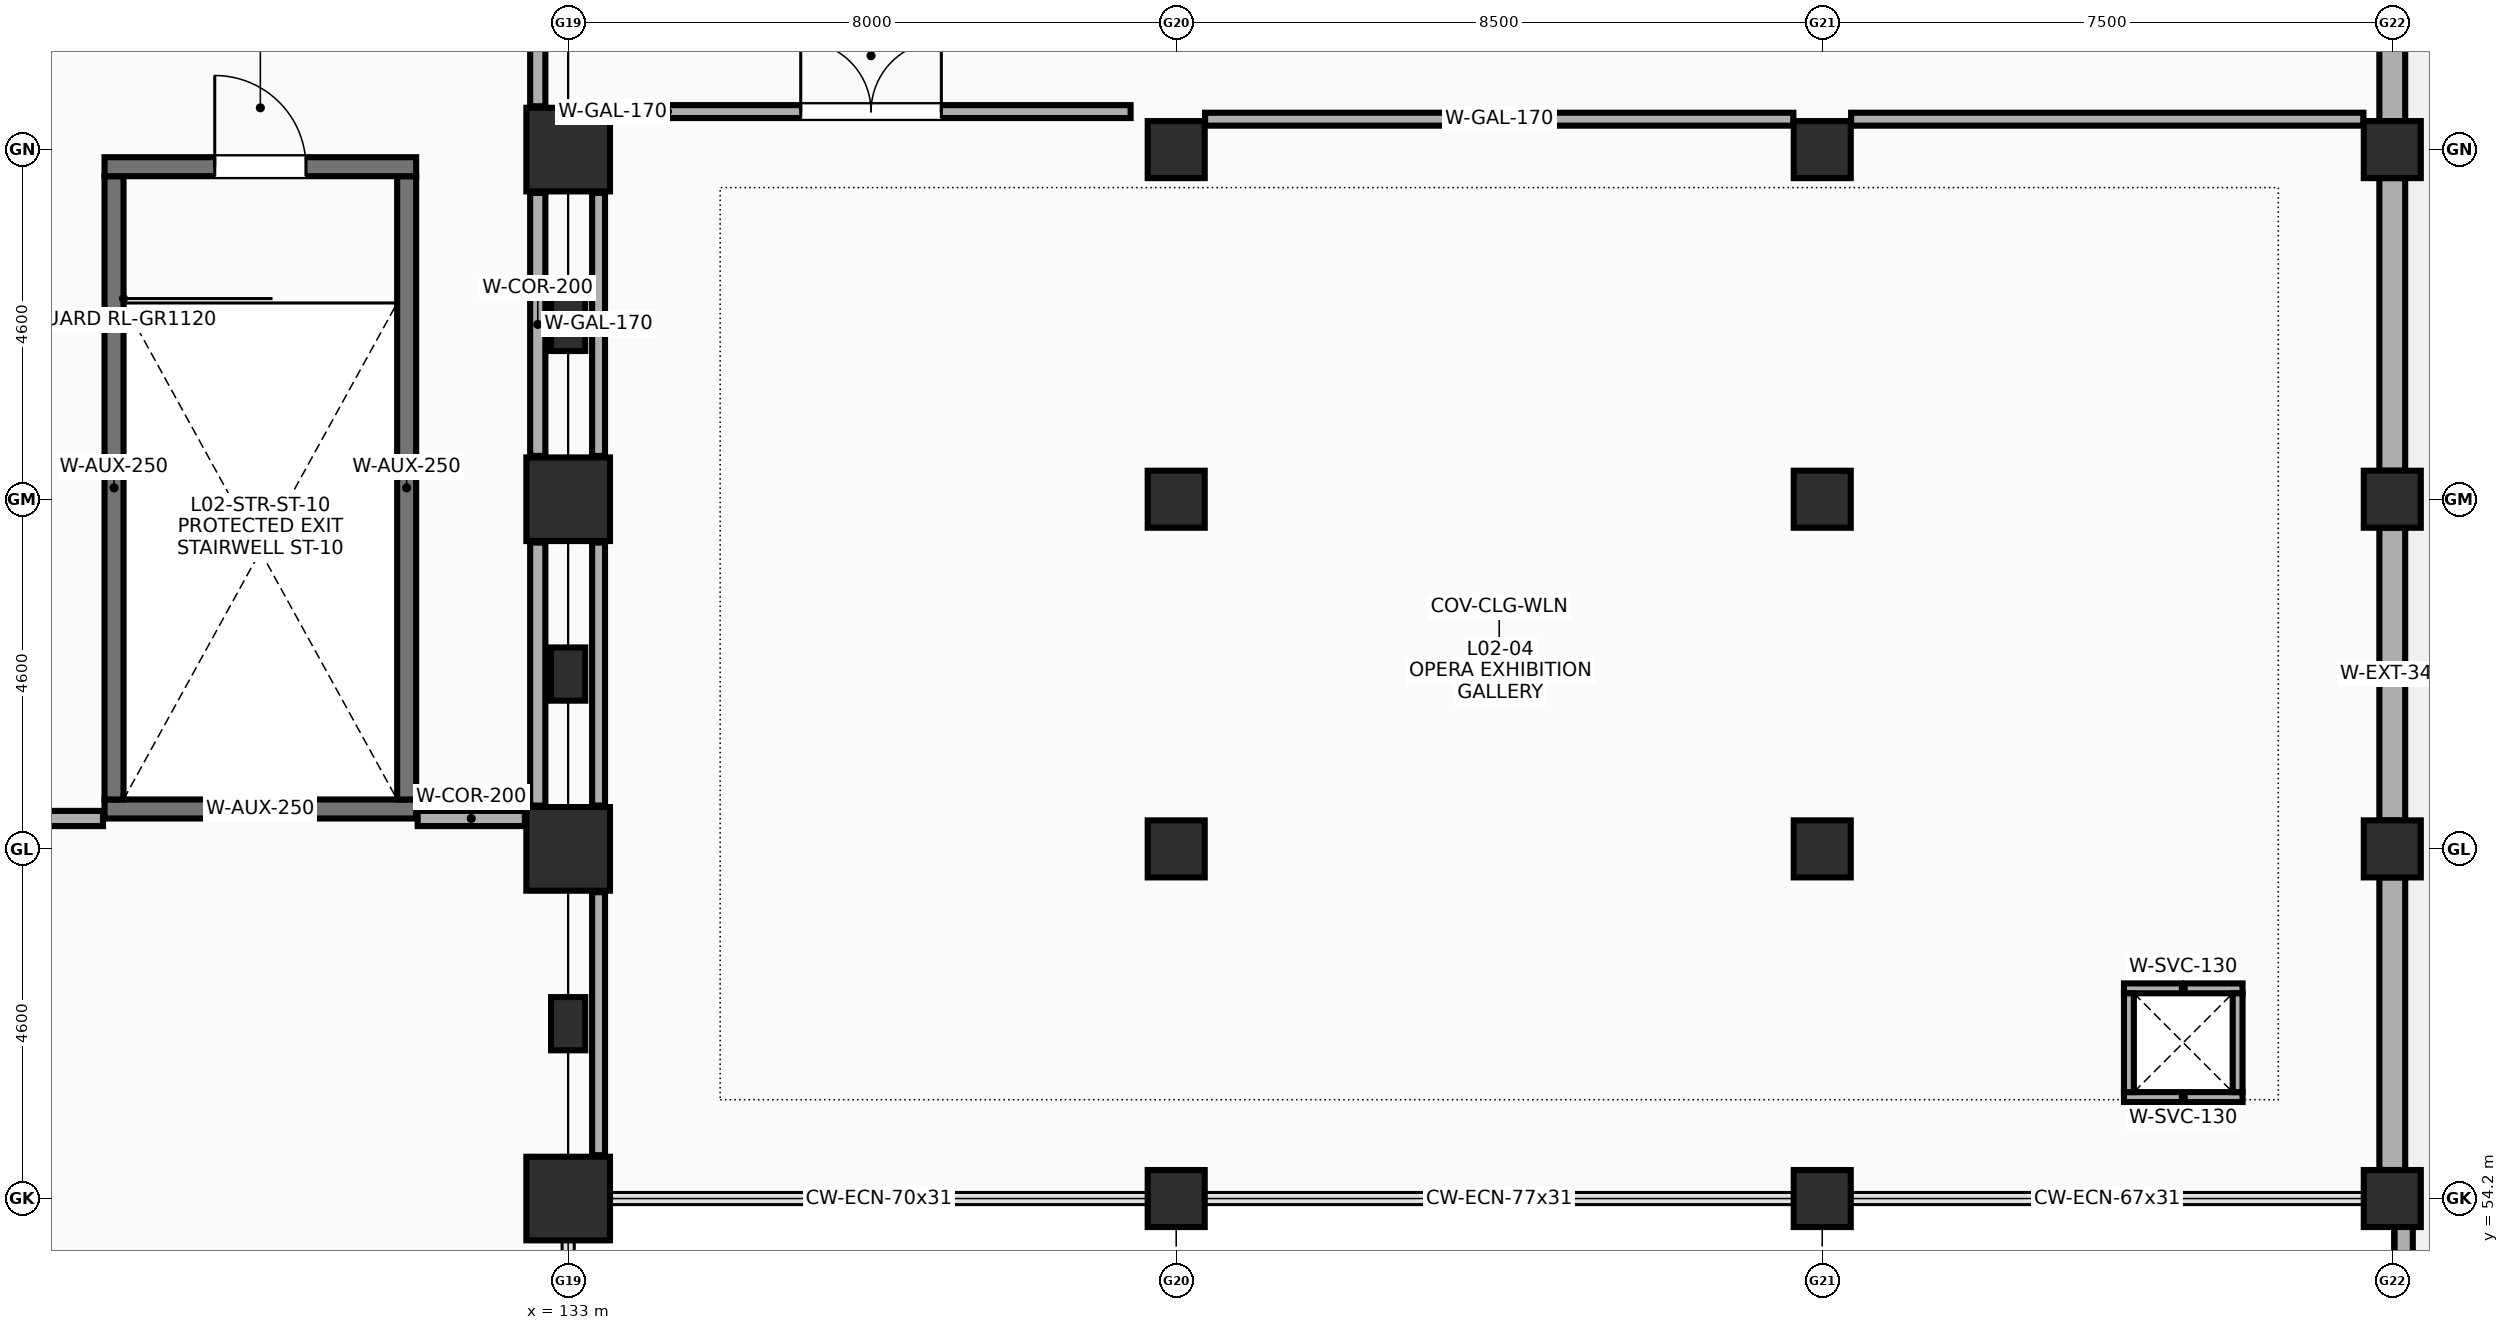
"""IFC4 building model, lengths in metres.
Left out: names, types, materials, properties, quantities, classifications, styles, units other than length and angle.
Written with IfcOpenShell. Run it as: python <this file> out.ifc"""

import sys

from ifc_helpers import new_model, si_unit, direction, frame, frame_2d, origin, origin_2d, place, context, subcontext, project, spatial, rectangle, extrude, element, fill, save


model = new_model("IFC4")
c1 = context("Model", 3, precision=1e-05, world=origin(), true_north=direction((0.0, 1.0)))
c2 = subcontext(c1, "Body", "Model", "MODEL_VIEW")
j1 = project(units=[si_unit("LENGTHUNIT", "METRE"), si_unit("PLANEANGLEUNIT", "RADIAN")], contexts=[c1])
p1 = place(None, origin())
s1 = spatial("IfcSite", under=j1, at=p1, CompositionType="ELEMENT")
p2 = place(p1, origin())
s2 = spatial("IfcBuilding", under=s1, at=p2, CompositionType="ELEMENT")
p3 = place(p2, frame((0.0, 0.0, 9.8)))
s3 = spatial("IfcBuildingStorey", under=s2, at=p3, CompositionType="ELEMENT", Elevation=9.8)
for number, where, z_axis, x_axis in (
    (1, (133.0, 54.2, 0.0), (0.0, 0.0, 1.0), (1.0, 0.0, 0.0)),
    (2, (133.0, 58.8, 0.0), (0.0, 0.0, 1.0), (1.0, 0.0, 0.0)),
    (3, (133.0, 63.4, 0.0), (0.0, 0.0, 1.0), (1.0, 0.0, 0.0)),
    (4, (133.0, 68.0, 0.0), (0.0, 0.0, 1.0), (1.0, 0.0, 0.0)),
):
    element("IfcColumn", number, at=place(p3, frame(where, z_axis=z_axis, x_axis=x_axis)), inside=s3, PredefinedType="COLUMN", context=c2, shape_type="SweptSolid", body=[
        extrude(rectangle(XDim=1.1, YDim=1.1, at=origin_2d()), origin(), (0.0, 0.0, 1.0), 4.4),
    ])
for number, where, z_axis, x_axis in (
    (5, (141.0, 54.2, 0.0), (0.0, 0.0, 1.0), (1.0, 0.0, 0.0)),
    (6, (141.0, 58.8, 0.0), (0.0, 0.0, 1.0), (1.0, 0.0, 0.0)),
    (7, (141.0, 63.4, 0.0), (0.0, 0.0, 1.0), (1.0, 0.0, 0.0)),
    (8, (141.0, 68.0, 0.0), (0.0, 0.0, 1.0), (1.0, 0.0, 0.0)),
    (9, (149.5, 54.2, 0.0), (0.0, 0.0, 1.0), (1.0, 0.0, 0.0)),
    (10, (149.5, 58.8, 0.0), (0.0, 0.0, 1.0), (1.0, 0.0, 0.0)),
    (11, (149.5, 63.4, 0.0), (0.0, 0.0, 1.0), (1.0, 0.0, 0.0)),
    (12, (149.5, 68.0, 0.0), (0.0, 0.0, 1.0), (1.0, 0.0, 0.0)),
    (13, (157.0, 54.2, 0.0), (0.0, 0.0, 1.0), (1.0, 0.0, 0.0)),
    (14, (157.0, 58.8, 0.0), (0.0, 0.0, 1.0), (1.0, 0.0, 0.0)),
    (15, (157.0, 63.4, 0.0), (0.0, 0.0, 1.0), (1.0, 0.0, 0.0)),
    (16, (157.0, 68.0, 0.0), (0.0, 0.0, 1.0), (1.0, 0.0, 0.0)),
):
    element("IfcColumn", number, at=place(p3, frame(where, z_axis=z_axis, x_axis=x_axis)), inside=s3, PredefinedType="COLUMN", context=c2, shape_type="SweptSolid", body=[
        extrude(rectangle(XDim=0.75, YDim=0.75, at=origin_2d()), origin(), (0.0, 0.0, 1.0), 4.4),
    ])
for number, where, z_axis, x_axis in (
    (17, (133.0, 56.5, 0.0), (0.0, 0.0, 1.0), (1.0, 0.0, 0.0)),
    (18, (133.0, 61.1, 0.0), (0.0, 0.0, 1.0), (1.0, 0.0, 0.0)),
    (19, (133.0, 65.7, 0.0), (0.0, 0.0, 1.0), (1.0, 0.0, 0.0)),
):
    element("IfcColumn", number, at=place(p3, frame(where, z_axis=z_axis, x_axis=x_axis)), inside=s3, PredefinedType="PILASTER", context=c2, shape_type="SweptSolid", body=[
        extrude(rectangle(XDim=0.45, YDim=0.7, at=origin_2d()), origin(), (0.0, 0.0, 1.0), 4.4),
    ])
p4 = place(p3, frame((157.0, 54.575, 0.0), z_axis=(0.0, 0.0, 1.0), x_axis=(0.0, 1.0, 0.0)))
e20 = element("IfcWall", 20, at=p4, inside=s3, PredefinedType="SOLIDWALL", context=c2, shape_type="SweptSolid", body=[
    extrude(rectangle(XDim=3.85, YDim=0.34, at=frame_2d((1.925, 0.0))), origin(), (0.0, 0.0, 1.0), 3.15),
])
p5 = place(p3, frame((157.0, 59.175, 0.0), z_axis=(0.0, 0.0, 1.0), x_axis=(0.0, 1.0, 0.0)))
e21 = element("IfcWall", 21, at=p5, inside=s3, PredefinedType="SOLIDWALL", context=c2, shape_type="SweptSolid", body=[
    extrude(rectangle(XDim=3.85, YDim=0.34, at=frame_2d((1.925, 0.0))), origin(), (0.0, 0.0, 1.0), 3.15),
])
for number, where, z_axis, x_axis in (
    (22, (157.0, 63.775, 0.0), (0.0, 0.0, 1.0), (0.0, 1.0, 0.0)),
    (23, (157.0, 68.375, 0.0), (0.0, 0.0, 1.0), (0.0, 1.0, 0.0)),
):
    element("IfcWall", number, at=place(p3, frame(where, z_axis=z_axis, x_axis=x_axis)), inside=s3, PredefinedType="SOLIDWALL", context=c2, shape_type="SweptSolid", body=[
        extrude(rectangle(XDim=3.85, YDim=0.34, at=frame_2d((1.925, 0.0))), origin(), (0.0, 0.0, 1.0), 3.15),
    ])
p6 = place(p3, frame((126.9, 59.325, 0.0), z_axis=(0.0, 0.0, 1.0), x_axis=(1.0, 0.0, 0.0)))
e24 = element("IfcWall", 24, at=p6, inside=s3, PredefinedType="SHEAR", context=c2, shape_type="SweptSolid", body=[
    extrude(rectangle(XDim=4.1, YDim=0.25, at=frame_2d((2.05, 0.0))), origin(), (0.0, 0.0, 1.0), 4.4),
])
for number, where, z_axis, x_axis in (
    (25, (127.025, 59.45, 0.0), (0.0, 0.0, 1.0), (0.0, 1.0, 0.0)),
    (26, (130.875, 59.45, 0.0), (0.0, 0.0, 1.0), (0.0, 1.0, 0.0)),
):
    element("IfcWall", number, at=place(p3, frame(where, z_axis=z_axis, x_axis=x_axis)), inside=s3, PredefinedType="SHEAR", context=c2, shape_type="SweptSolid", body=[
        extrude(rectangle(XDim=8.2, YDim=0.25, at=frame_2d((4.1, 0.0))), origin(), (0.0, 0.0, 1.0), 4.4),
    ])
p7 = place(p3, frame((126.9, 67.775, 0.0), z_axis=(0.0, 0.0, 1.0), x_axis=(1.0, 0.0, 0.0)))
e27 = element("IfcWall", 27, at=p7, inside=s3, PredefinedType="SHEAR", context=c2, shape_type="SweptSolid", body=[
    extrude(rectangle(XDim=4.1, YDim=0.25, at=frame_2d((2.05, 0.0))), origin(), (0.0, 0.0, 1.0), 4.4),
])
p8 = place(p7, frame((1.45, 0.0, 0.0)))
e28 = element("IfcOpeningElement", 28, at=p8, cuts=e27, PredefinedType="OPENING", context=c2, shape_type="SweptSolid", body=[
    extrude(rectangle(XDim=1.2, YDim=2.15, at=frame_2d((0.6, 1.075))), frame((0.0, 0.135, 0.0), z_axis=(0.0, -1.0, 0.0), x_axis=(1.0, 0.0, 0.0)), (0.0, 0.0, 1.0), 0.27),
])
for number, where, z_axis, x_axis in (
    (29, (153.47, 55.535, 0.0), (0.0, 0.0, 1.0), (1.0, 0.0, 0.0)),
    (30, (153.47, 56.965, 0.0), (0.0, 0.0, 1.0), (1.0, 0.0, 0.0)),
):
    element("IfcWall", number, at=place(p3, frame(where, z_axis=z_axis, x_axis=x_axis)), inside=s3, PredefinedType="PARTITIONING", context=c2, shape_type="SweptSolid", body=[
        extrude(rectangle(XDim=1.56, YDim=0.13, at=frame_2d((0.78, 0.0))), origin(), (0.0, 0.0, 1.0), 4.1),
    ])
for number, where, z_axis, x_axis in (
    (31, (153.535, 55.6, 0.0), (0.0, 0.0, 1.0), (0.0, 1.0, 0.0)),
    (32, (154.965, 55.6, 0.0), (0.0, 0.0, 1.0), (0.0, 1.0, 0.0)),
):
    element("IfcWall", number, at=place(p3, frame(where, z_axis=z_axis, x_axis=x_axis)), inside=s3, PredefinedType="PARTITIONING", context=c2, shape_type="SweptSolid", body=[
        extrude(rectangle(XDim=1.3, YDim=0.13, at=frame_2d((0.65, 0.0))), origin(), (0.0, 0.0, 1.0), 4.1),
    ])
p9 = place(p3, frame((133.57, 68.5, 0.0), z_axis=(0.0, 0.0, 1.0), x_axis=(1.0, 0.0, 0.0)))
e33 = element("IfcWall", 33, at=p9, inside=s3, PredefinedType="PARTITIONING", context=c2, shape_type="SweptSolid", body=[
    extrude(rectangle(XDim=6.83, YDim=0.17, at=frame_2d((3.415, 0.0))), origin(), (0.0, 0.0, 1.0), 4.1),
])
p10 = place(p9, frame((2.49, 0.0, 0.0)))
e34 = element("IfcOpeningElement", 34, at=p10, cuts=e33, PredefinedType="OPENING", context=c2, shape_type="SweptSolid", body=[
    extrude(rectangle(XDim=1.85, YDim=2.3, at=frame_2d((0.925, 1.15))), frame((0.0, 0.095, 0.0), z_axis=(0.0, -1.0, 0.0), x_axis=(1.0, 0.0, 0.0)), (0.0, 0.0, 1.0), 0.19),
])
for number, where, z_axis, x_axis in (
    (35, (132.6, 59.37, 0.0), (0.0, 0.0, 1.0), (0.0, 1.0, 0.0)),
    (36, (132.6, 63.97, 0.0), (0.0, 0.0, 1.0), (0.0, 1.0, 0.0)),
    (37, (132.6, 68.57, 0.0), (0.0, 0.0, 1.0), (0.0, 1.0, 0.0)),
):
    element("IfcWall", number, at=place(p3, frame(where, z_axis=z_axis, x_axis=x_axis)), inside=s3, PredefinedType="PARTITIONING", context=c2, shape_type="SweptSolid", body=[
        extrude(rectangle(XDim=3.46, YDim=0.2, at=frame_2d((1.73, 0.0))), origin(), (0.0, 0.0, 1.0), 4.1),
    ])
p11 = place(p3, frame((141.38, 68.4, 0.0), z_axis=(0.0, 0.0, 1.0), x_axis=(1.0, 0.0, 0.0)))
e38 = element("IfcWall", 38, at=p11, inside=s3, PredefinedType="PARTITIONING", context=c2, shape_type="SweptSolid", body=[
    extrude(rectangle(XDim=7.74, YDim=0.17, at=frame_2d((3.87, 0.0))), origin(), (0.0, 0.0, 1.0), 4.1),
])
p12 = place(p3, frame((149.88, 68.4, 0.0), z_axis=(0.0, 0.0, 1.0), x_axis=(1.0, 0.0, 0.0)))
e39 = element("IfcWall", 39, at=p12, inside=s3, PredefinedType="PARTITIONING", context=c2, shape_type="SweptSolid", body=[
    extrude(rectangle(XDim=6.74, YDim=0.17, at=frame_2d((3.37, 0.0))), origin(), (0.0, 0.0, 1.0), 4.1),
])
for number, where, z_axis, x_axis in (
    (40, (133.4, 54.77, 0.0), (0.0, 0.0, 1.0), (0.0, 1.0, 0.0)),
    (41, (133.4, 59.37, 0.0), (0.0, 0.0, 1.0), (0.0, 1.0, 0.0)),
    (42, (133.4, 63.97, 0.0), (0.0, 0.0, 1.0), (0.0, 1.0, 0.0)),
):
    element("IfcWall", number, at=place(p3, frame(where, z_axis=z_axis, x_axis=x_axis)), inside=s3, PredefinedType="PARTITIONING", context=c2, shape_type="SweptSolid", body=[
        extrude(rectangle(XDim=3.46, YDim=0.17, at=frame_2d((1.73, 0.0))), origin(), (0.0, 0.0, 1.0), 4.1),
    ])
p13 = place(p3, frame((111.62, 59.2, 0.0), z_axis=(0.0, 0.0, 1.0), x_axis=(1.0, 0.0, 0.0)))
e43 = element("IfcWall", 43, at=p13, inside=s3, PredefinedType="PARTITIONING", context=c2, shape_type="SweptSolid", body=[
    extrude(rectangle(XDim=15.26, YDim=0.2, at=frame_2d((7.63, 0.0))), origin(), (0.0, 0.0, 1.0), 4.1),
])
p14 = place(p3, frame((131.02, 59.2, 0.0), z_axis=(0.0, 0.0, 1.0), x_axis=(1.0, 0.0, 0.0)))
e44 = element("IfcWall", 44, at=p14, inside=s3, PredefinedType="PARTITIONING", context=c2, shape_type="SweptSolid", body=[
    extrude(rectangle(XDim=1.41, YDim=0.2, at=frame_2d((0.705, 0.0))), origin(), (0.0, 0.0, 1.0), 4.1),
])
p15 = place(p3, frame((157.15, 31.6, 0.0), z_axis=(0.0, 0.0, 1.0), x_axis=(0.0, 1.0, 0.0)))
e45 = element("IfcWall", 45, at=p15, inside=s3, PredefinedType="PARAPET", context=c2, shape_type="SweptSolid", body=[
    extrude(rectangle(XDim=22.955, YDim=0.24, at=frame_2d((11.478, 0.0))), origin(), (0.0, 0.0, 1.0), 0.65),
])
for number, where, z_axis, x_axis in (
    (46, (157.15, 58.445, 0.0), (0.0, 0.0, 1.0), (0.0, 1.0, 0.0)),
    (47, (157.15, 63.045, 0.0), (0.0, 0.0, 1.0), (0.0, 1.0, 0.0)),
    (48, (157.15, 67.645, 0.0), (0.0, 0.0, 1.0), (0.0, 1.0, 0.0)),
):
    element("IfcWall", number, at=place(p3, frame(where, z_axis=z_axis, x_axis=x_axis)), inside=s3, PredefinedType="PARAPET", context=c2, shape_type="SweptSolid", body=[
        extrude(rectangle(XDim=0.71, YDim=0.24, at=frame_2d((0.355, 0.0))), origin(), (0.0, 0.0, 1.0), 0.65),
    ])
p16 = place(p8, origin())
e49 = element("IfcDoor", 49, at=p16, inside=s3, OperationType="SINGLE_SWING_LEFT", PredefinedType="DOOR", context=c2, shape_type="SweptSolid", body=[
    extrude(rectangle(XDim=1.2, YDim=2.15, at=frame_2d((0.6, 1.075))), frame((0.0, 0.025, 0.0), z_axis=(0.0, -1.0, 0.0), x_axis=(1.0, 0.0, 0.0)), (0.0, 0.0, 1.0), 0.05),
])
fill(e28, e49)
p17 = place(p10, origin())
e50 = element("IfcDoor", 50, at=p17, inside=s3, OperationType="DOUBLE_DOOR_SINGLE_SWING", PredefinedType="DOOR", context=c2, shape_type="SweptSolid", body=[
    extrude(rectangle(XDim=1.85, YDim=2.3, at=frame_2d((0.925, 1.15))), frame((0.0, 0.025, 0.0), z_axis=(0.0, -1.0, 0.0), x_axis=(1.0, 0.0, 0.0)), (0.0, 0.0, 1.0), 0.05),
])
fill(e34, e50)
save(model, sys.argv[1])
